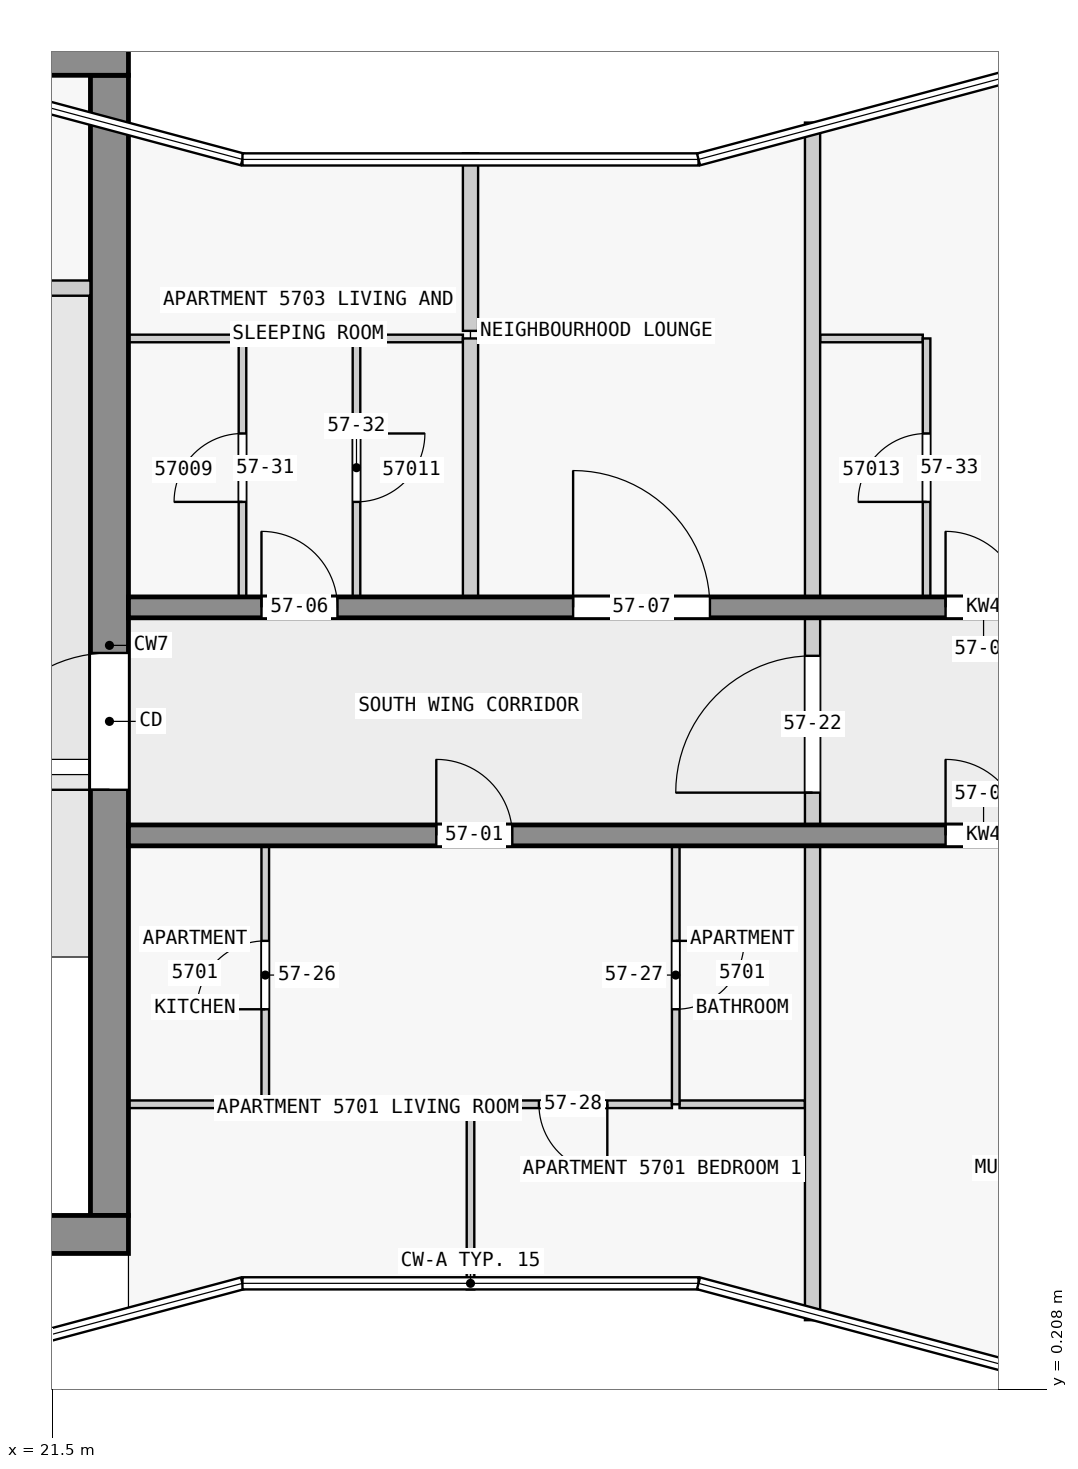
"""IFC4 building model, lengths in metres.
Left out: names, types, materials, properties, quantities, classifications, styles, units other than length and angle.
Written with IfcOpenShell. Run it as: python <this file> out.ifc"""

import sys

from ifc_helpers import new_model, si_unit, direction, frame, frame_2d, origin, place, context, subcontext, project, spatial, rectangle, extrude, element, fill, save


model = new_model("IFC4")
c1 = context("Model", 3, precision=1e-05, world=origin(), true_north=direction((0.0, 1.0)))
c2 = subcontext(c1, "Body", "Model", "MODEL_VIEW")
j1 = project(units=[si_unit("LENGTHUNIT", "METRE"), si_unit("PLANEANGLEUNIT", "RADIAN")], contexts=[c1])
p1 = place(None, origin())
s1 = spatial("IfcSite", under=j1, at=p1, CompositionType="ELEMENT")
p2 = place(p1, origin())
s2 = spatial("IfcBuilding", under=s1, at=p2, CompositionType="ELEMENT")
p3 = place(p2, frame((0.0, 0.0, 218.9)))
s3 = spatial("IfcBuildingStorey", under=s2, at=p3, CompositionType="ELEMENT", Elevation=218.9)
p4 = place(p3, frame((1.8, 2.25, 0.0), z_axis=(0.0, 0.0, 1.0), x_axis=(1.0, 0.0, 0.0)))
e1 = element("IfcWall", 1, at=p4, inside=s3, PredefinedType="SHEAR", context=c2, shape_type="SweptSolid", body=[
    extrude(rectangle(XDim=20.7, YDim=0.5, at=frame_2d((10.35, 0.0))), origin(), (0.0, 0.0, 1.0), 3.25),
])
p5 = place(p3, frame((1.38, 17.75, 0.0), z_axis=(0.0, 0.0, 1.0), x_axis=(1.0, 0.0, 0.0)))
e2 = element("IfcWall", 2, at=p5, inside=s3, PredefinedType="SHEAR", context=c2, shape_type="SweptSolid", body=[
    extrude(rectangle(XDim=21.12, YDim=0.5, at=frame_2d((10.56, 0.0))), origin(), (0.0, 0.0, 1.0), 3.25),
])
p6 = place(p5, frame((6.3, 0.0, 0.0)))
e3 = element("IfcOpeningElement", 3, at=p6, cuts=e2, PredefinedType="OPENING", context=c2, shape_type="SweptSolid", body=[
    extrude(rectangle(XDim=1.8, YDim=2.1, at=frame_2d((0.9, 1.05))), frame((0.0, 0.26, 0.0), z_axis=(0.0, -1.0, 0.0), x_axis=(1.0, 0.0, 0.0)), (0.0, 0.0, 1.0), 0.52),
])
p7 = place(p3, frame((22.25, 2.5, 0.0), z_axis=(0.0, 0.0, 1.0), x_axis=(0.0, 1.0, 0.0)))
e4 = element("IfcWall", 4, at=p7, inside=s3, PredefinedType="SHEAR", context=c2, shape_type="SweptSolid", body=[
    extrude(rectangle(XDim=15.0, YDim=0.5, at=frame_2d((7.5, 0.0))), origin(), (0.0, 0.0, 1.0), 3.25),
])
p8 = place(p7, frame((5.6, 0.0, 0.0)))
e5 = element("IfcOpeningElement", 5, at=p8, cuts=e4, PredefinedType="OPENING", context=c2, shape_type="SweptSolid", body=[
    extrude(rectangle(XDim=1.8, YDim=2.1, at=frame_2d((0.9, 1.05))), frame((0.0, 0.26, 0.0), z_axis=(0.0, -1.0, 0.0), x_axis=(1.0, 0.0, 0.0)), (0.0, 0.0, 1.0), 0.52),
])
p9 = place(p3, frame((22.5, 7.5, 0.0), z_axis=(0.0, 0.0, 1.0), x_axis=(1.0, 0.0, 0.0)))
e6 = element("IfcWall", 6, at=p9, inside=s3, PredefinedType="SHEAR", context=c2, shape_type="SweptSolid", body=[
    extrude(rectangle(XDim=22.5, YDim=0.275, at=frame_2d((11.25, 0.0))), origin(), (0.0, 0.0, 1.0), 3.25),
])
p10 = place(p9, frame((4.05, 0.0, 0.0)))
e7 = element("IfcOpeningElement", 7, at=p10, cuts=e6, PredefinedType="OPENING", context=c2, shape_type="SweptSolid", body=[
    extrude(rectangle(XDim=1.0, YDim=2.1, at=frame_2d((0.5, 1.05))), frame((0.0, 0.147, 0.0), z_axis=(0.0, -1.0, 0.0), x_axis=(1.0, 0.0, 0.0)), (0.0, 0.0, 1.0), 0.295),
])
p11 = place(p9, frame((10.75, 0.0, 0.0)))
e8 = element("IfcOpeningElement", 8, at=p11, cuts=e6, PredefinedType="OPENING", context=c2, shape_type="SweptSolid", body=[
    extrude(rectangle(XDim=1.0, YDim=2.1, at=frame_2d((0.5, 1.05))), frame((0.0, 0.147, 0.0), z_axis=(0.0, -1.0, 0.0), x_axis=(1.0, 0.0, 0.0)), (0.0, 0.0, 1.0), 0.295),
])
p12 = place(p9, frame((15.25, 0.0, 0.0)))
e9 = element("IfcOpeningElement", 9, at=p12, cuts=e6, PredefinedType="OPENING", context=c2, shape_type="SweptSolid", body=[
    extrude(rectangle(XDim=1.0, YDim=2.1, at=frame_2d((0.5, 1.05))), frame((0.0, 0.147, 0.0), z_axis=(0.0, -1.0, 0.0), x_axis=(1.0, 0.0, 0.0)), (0.0, 0.0, 1.0), 0.295),
])
p13 = place(p9, frame((18.75, 0.0, 0.0)))
e10 = element("IfcOpeningElement", 10, at=p13, cuts=e6, PredefinedType="OPENING", context=c2, shape_type="SweptSolid", body=[
    extrude(rectangle(XDim=0.9, YDim=2.1, at=frame_2d((0.45, 1.05))), frame((0.0, 0.147, 0.0), z_axis=(0.0, -1.0, 0.0), x_axis=(1.0, 0.0, 0.0)), (0.0, 0.0, 1.0), 0.295),
])
p14 = place(p9, frame((20.95, 0.0, 0.0)))
e11 = element("IfcOpeningElement", 11, at=p14, cuts=e6, PredefinedType="OPENING", context=c2, shape_type="SweptSolid", body=[
    extrude(rectangle(XDim=1.0, YDim=2.1, at=frame_2d((0.5, 1.05))), frame((0.0, 0.147, 0.0), z_axis=(0.0, -1.0, 0.0), x_axis=(1.0, 0.0, 0.0)), (0.0, 0.0, 1.0), 0.295),
])
p15 = place(p3, frame((22.5, 10.5, 0.0), z_axis=(0.0, 0.0, 1.0), x_axis=(1.0, 0.0, 0.0)))
e12 = element("IfcWall", 12, at=p15, inside=s3, PredefinedType="SHEAR", context=c2, shape_type="SweptSolid", body=[
    extrude(rectangle(XDim=22.5, YDim=0.275, at=frame_2d((11.25, 0.0))), origin(), (0.0, 0.0, 1.0), 3.25),
])
p16 = place(p15, frame((1.75, 0.0, 0.0)))
e13 = element("IfcOpeningElement", 13, at=p16, cuts=e12, PredefinedType="OPENING", context=c2, shape_type="SweptSolid", body=[
    extrude(rectangle(XDim=1.0, YDim=2.1, at=frame_2d((0.5, 1.05))), frame((0.0, 0.147, 0.0), z_axis=(0.0, -1.0, 0.0), x_axis=(1.0, 0.0, 0.0)), (0.0, 0.0, 1.0), 0.295),
])
p17 = place(p15, frame((5.85, 0.0, 0.0)))
e14 = element("IfcOpeningElement", 14, at=p17, cuts=e12, PredefinedType="OPENING", context=c2, shape_type="SweptSolid", body=[
    extrude(rectangle(XDim=1.8, YDim=2.1, at=frame_2d((0.9, 1.05))), frame((0.0, 0.147, 0.0), z_axis=(0.0, -1.0, 0.0), x_axis=(1.0, 0.0, 0.0)), (0.0, 0.0, 1.0), 0.295),
])
p18 = place(p15, frame((10.75, 0.0, 0.0)))
e15 = element("IfcOpeningElement", 15, at=p18, cuts=e12, PredefinedType="OPENING", context=c2, shape_type="SweptSolid", body=[
    extrude(rectangle(XDim=1.0, YDim=2.1, at=frame_2d((0.5, 1.05))), frame((0.0, 0.147, 0.0), z_axis=(0.0, -1.0, 0.0), x_axis=(1.0, 0.0, 0.0)), (0.0, 0.0, 1.0), 0.295),
])
p19 = place(p15, frame((16.85, 0.0, 0.0)))
e16 = element("IfcOpeningElement", 16, at=p19, cuts=e12, PredefinedType="OPENING", context=c2, shape_type="SweptSolid", body=[
    extrude(rectangle(XDim=1.0, YDim=2.1, at=frame_2d((0.5, 1.05))), frame((0.0, 0.147, 0.0), z_axis=(0.0, -1.0, 0.0), x_axis=(1.0, 0.0, 0.0)), (0.0, 0.0, 1.0), 0.295),
])
p20 = place(p3, frame((18.6, 14.7, 0.0), z_axis=(0.0, 0.0, 1.0), x_axis=(1.0, 0.0, 0.0)))
e17 = element("IfcWall", 17, at=p20, inside=s3, PredefinedType="PARTITIONING", context=c2, shape_type="SweptSolid", body=[
    extrude(rectangle(XDim=3.4, YDim=0.2, at=frame_2d((1.7, 0.0))), origin(), (0.0, 0.0, 1.0), 3.25),
])
p21 = place(p20, frame((0.15, 0.0, 0.0)))
e18 = element("IfcOpeningElement", 18, at=p21, cuts=e17, PredefinedType="OPENING", context=c2, shape_type="SweptSolid", body=[
    extrude(rectangle(XDim=0.9, YDim=2.1, at=frame_2d((0.45, 1.05))), frame((0.0, 0.11, 0.0), z_axis=(0.0, -1.0, 0.0), x_axis=(1.0, 0.0, 0.0)), (0.0, 0.0, 1.0), 0.22),
])
p22 = place(p20, frame((1.85, 0.0, 0.0)))
e19 = element("IfcOpeningElement", 19, at=p22, cuts=e17, PredefinedType="OPENING", context=c2, shape_type="SweptSolid", body=[
    extrude(rectangle(XDim=0.9, YDim=2.1, at=frame_2d((0.45, 1.05))), frame((0.0, 0.11, 0.0), z_axis=(0.0, -1.0, 0.0), x_axis=(1.0, 0.0, 0.0)), (0.0, 0.0, 1.0), 0.22),
])
p23 = place(p3, frame((29.65, 3.962, 0.0), z_axis=(0.0, 0.0, 1.0), x_axis=(-1.0, 0.0, 0.0)))
e20 = element("IfcWall", 20, at=p23, inside=s3, PredefinedType="PARTITIONING", context=c2, shape_type="SweptSolid", body=[
    extrude(rectangle(XDim=2.65, YDim=0.1, at=frame_2d((1.325, 0.0))), origin(), (0.0, 0.0, 1.0), 3.25),
])
p24 = place(p23, frame((0.85, 0.0, 0.0)))
e21 = element("IfcOpeningElement", 21, at=p24, cuts=e20, PredefinedType="OPENING", context=c2, shape_type="SweptSolid", body=[
    extrude(rectangle(XDim=0.9, YDim=2.1, at=frame_2d((0.45, 1.05))), frame((0.0, 0.06, 0.0), z_axis=(0.0, -1.0, 0.0), x_axis=(1.0, 0.0, 0.0)), (0.0, 0.0, 1.0), 0.12),
])
p25 = place(p3, frame((22.5, 3.962, 0.0), z_axis=(0.0, 0.0, 1.0), x_axis=(1.0, 0.0, 0.0)))
e22 = element("IfcWall", 22, at=p25, inside=s3, PredefinedType="PARTITIONING", context=c2, shape_type="SweptSolid", body=[
    extrude(rectangle(XDim=1.75, YDim=0.1, at=frame_2d((0.875, 0.0))), origin(), (0.0, 0.0, 1.0), 3.25),
])
p26 = place(p3, frame((29.75, 3.962, 0.0), z_axis=(0.0, 0.0, 1.0), x_axis=(1.0, 0.0, 0.0)))
e23 = element("IfcWall", 23, at=p26, inside=s3, PredefinedType="PARTITIONING", context=c2, shape_type="SweptSolid", body=[
    extrude(rectangle(XDim=1.65, YDim=0.1, at=frame_2d((0.825, 0.0))), origin(), (0.0, 0.0, 1.0), 3.25),
])
p27 = place(p3, frame((23.95, 14.038, 0.0), z_axis=(0.0, 0.0, 1.0), x_axis=(-1.0, 0.0, 0.0)))
e24 = element("IfcWall", 24, at=p27, inside=s3, PredefinedType="PARTITIONING", context=c2, shape_type="SweptSolid", body=[
    extrude(rectangle(XDim=1.45, YDim=0.1, at=frame_2d((0.725, 0.0))), origin(), (0.0, 0.0, 1.0), 3.25),
])
for number, where, z_axis, x_axis in (
    (25, (26.9, 14.038, 0.0), (0.0, 0.0, 1.0), (-1.0, 0.0, 0.0)),
    (26, (32.95, 14.038, 0.0), (0.0, 0.0, 1.0), (-1.0, 0.0, 0.0)),
):
    element("IfcWall", number, at=place(p3, frame(where, z_axis=z_axis, x_axis=x_axis)), inside=s3, PredefinedType="PARTITIONING", context=c2, shape_type="SweptSolid", body=[
        extrude(rectangle(XDim=1.35, YDim=0.1, at=frame_2d((0.675, 0.0))), origin(), (0.0, 0.0, 1.0), 3.25),
    ])
p28 = place(p3, frame((24.0, 10.637, 0.0), z_axis=(0.0, 0.0, 1.0), x_axis=(0.0, 1.0, 0.0)))
e27 = element("IfcWall", 27, at=p28, inside=s3, PredefinedType="PARTITIONING", context=c2, shape_type="SweptSolid", body=[
    extrude(rectangle(XDim=3.4, YDim=0.1, at=frame_2d((1.7, 0.0))), origin(), (0.0, 0.0, 1.0), 3.25),
])
p29 = place(p28, frame((1.25, 0.0, 0.0)))
e28 = element("IfcOpeningElement", 28, at=p29, cuts=e27, PredefinedType="OPENING", context=c2, shape_type="SweptSolid", body=[
    extrude(rectangle(XDim=0.9, YDim=2.1, at=frame_2d((0.45, 1.05))), frame((0.0, 0.06, 0.0), z_axis=(0.0, -1.0, 0.0), x_axis=(1.0, 0.0, 0.0)), (0.0, 0.0, 1.0), 0.12),
])
p30 = place(p3, frame((24.3, 3.962, 0.0), z_axis=(0.0, 0.0, 1.0), x_axis=(0.0, 1.0, 0.0)))
e29 = element("IfcWall", 29, at=p30, inside=s3, PredefinedType="PARTITIONING", context=c2, shape_type="SweptSolid", body=[
    extrude(rectangle(XDim=3.4, YDim=0.1, at=frame_2d((1.7, 0.0))), origin(), (0.0, 0.0, 1.0), 3.25),
])
p31 = place(p30, frame((1.25, 0.0, 0.0)))
e30 = element("IfcOpeningElement", 30, at=p31, cuts=e29, PredefinedType="OPENING", context=c2, shape_type="SweptSolid", body=[
    extrude(rectangle(XDim=0.9, YDim=2.1, at=frame_2d((0.45, 1.05))), frame((0.0, 0.06, 0.0), z_axis=(0.0, -1.0, 0.0), x_axis=(1.0, 0.0, 0.0)), (0.0, 0.0, 1.0), 0.12),
])
p32 = place(p3, frame((25.5, 14.038, 0.0), z_axis=(0.0, 0.0, 1.0), x_axis=(0.0, -1.0, 0.0)))
e31 = element("IfcWall", 31, at=p32, inside=s3, PredefinedType="PARTITIONING", context=c2, shape_type="SweptSolid", body=[
    extrude(rectangle(XDim=3.4, YDim=0.1, at=frame_2d((1.7, 0.0))), origin(), (0.0, 0.0, 1.0), 3.25),
])
p33 = place(p32, frame((1.25, 0.0, 0.0)))
e32 = element("IfcOpeningElement", 32, at=p33, cuts=e31, PredefinedType="OPENING", context=c2, shape_type="SweptSolid", body=[
    extrude(rectangle(XDim=0.9, YDim=2.1, at=frame_2d((0.45, 1.05))), frame((0.0, 0.06, 0.0), z_axis=(0.0, -1.0, 0.0), x_axis=(1.0, 0.0, 0.0)), (0.0, 0.0, 1.0), 0.12),
])
p34 = place(p3, frame((27.0, 3.913, 0.0), z_axis=(0.0, 0.0, 1.0), x_axis=(0.0, -1.0, 0.0)))
e33 = element("IfcWall", 33, at=p34, inside=s3, PredefinedType="PARTITIONING", context=c2, shape_type="SweptSolid", body=[
    extrude(rectangle(XDim=2.386, YDim=0.1, at=frame_2d((1.193, 0.0))), origin(), (0.0, 0.0, 1.0), 3.25),
])
p35 = place(p3, frame((27.0, 16.473, 0.0), z_axis=(0.0, 0.0, 1.0), x_axis=(0.0, -1.0, 0.0)))
e34 = element("IfcWall", 34, at=p35, inside=s3, PredefinedType="PARTITIONING", context=c2, shape_type="SweptSolid", body=[
    extrude(rectangle(XDim=2.336, YDim=0.2, at=frame_2d((1.168, 0.0))), origin(), (0.0, 0.0, 1.0), 3.25),
])
p36 = place(p3, frame((27.0, 10.637, 0.0), z_axis=(0.0, 0.0, 1.0), x_axis=(0.0, 1.0, 0.0)))
e35 = element("IfcWall", 35, at=p36, inside=s3, PredefinedType="PARTITIONING", context=c2, shape_type="SweptSolid", body=[
    extrude(rectangle(XDim=3.4, YDim=0.2, at=frame_2d((1.7, 0.0))), origin(), (0.0, 0.0, 1.0), 3.25),
])
p37 = place(p3, frame((29.7, 7.363, 0.0), z_axis=(0.0, 0.0, 1.0), x_axis=(0.0, -1.0, 0.0)))
e36 = element("IfcWall", 36, at=p37, inside=s3, PredefinedType="PARTITIONING", context=c2, shape_type="SweptSolid", body=[
    extrude(rectangle(XDim=3.4, YDim=0.1, at=frame_2d((1.7, 0.0))), origin(), (0.0, 0.0, 1.0), 3.25),
])
p38 = place(p37, frame((1.25, 0.0, 0.0)))
e37 = element("IfcOpeningElement", 37, at=p38, cuts=e36, PredefinedType="OPENING", context=c2, shape_type="SweptSolid", body=[
    extrude(rectangle(XDim=0.9, YDim=2.1, at=frame_2d((0.45, 1.05))), frame((0.0, 0.06, 0.0), z_axis=(0.0, -1.0, 0.0), x_axis=(1.0, 0.0, 0.0)), (0.0, 0.0, 1.0), 0.12),
])
for number, where, z_axis, x_axis in (
    (38, (31.5, 1.122, 0.0), (0.0, 0.0, 1.0), (0.0, 1.0, 0.0)),
    (39, (31.5, 10.637, 0.0), (0.0, 0.0, 1.0), (0.0, 1.0, 0.0)),
):
    element("IfcWall", number, at=place(p3, frame(where, z_axis=z_axis, x_axis=x_axis)), inside=s3, PredefinedType="PARTITIONING", context=c2, shape_type="SweptSolid", body=[
        extrude(rectangle(XDim=6.24, YDim=0.2, at=frame_2d((3.12, 0.0))), origin(), (0.0, 0.0, 1.0), 3.25),
    ])
p39 = place(p3, frame((33.0, 10.637, 0.0), z_axis=(0.0, 0.0, 1.0), x_axis=(0.0, 1.0, 0.0)))
e40 = element("IfcWall", 40, at=p39, inside=s3, PredefinedType="PARTITIONING", context=c2, shape_type="SweptSolid", body=[
    extrude(rectangle(XDim=3.4, YDim=0.1, at=frame_2d((1.7, 0.0))), origin(), (0.0, 0.0, 1.0), 3.25),
])
p40 = place(p39, frame((1.25, 0.0, 0.0)))
e41 = element("IfcOpeningElement", 41, at=p40, cuts=e40, PredefinedType="OPENING", context=c2, shape_type="SweptSolid", body=[
    extrude(rectangle(XDim=0.9, YDim=2.1, at=frame_2d((0.45, 1.05))), frame((0.0, 0.06, 0.0), z_axis=(0.0, -1.0, 0.0), x_axis=(1.0, 0.0, 0.0)), (0.0, 0.0, 1.0), 0.12),
])
p41 = place(p3, frame((31.5, 7.462, 0.0), z_axis=(0.0, 0.0, 1.0), x_axis=(0.0, 1.0, 0.0)))
e42 = element("IfcWall", 42, at=p41, inside=s3, PredefinedType="PARTITIONING", context=c2, shape_type="SweptSolid", body=[
    extrude(rectangle(XDim=3.075, YDim=0.2, at=frame_2d((1.538, 0.0))), origin(), (0.0, 0.0, 1.0), 3.25),
])
p42 = place(p41, frame((0.6, 0.0, 0.0)))
e43 = element("IfcOpeningElement", 43, at=p42, cuts=e42, PredefinedType="OPENING", context=c2, shape_type="SweptSolid", body=[
    extrude(rectangle(XDim=1.8, YDim=2.1, at=frame_2d((0.9, 1.05))), frame((0.0, 0.11, 0.0), z_axis=(0.0, -1.0, 0.0), x_axis=(1.0, 0.0, 0.0)), (0.0, 0.0, 1.0), 0.22),
])
p43 = place(p8, origin())
e44 = element("IfcDoor", 44, at=p43, inside=s3, OperationType="DOUBLE_DOOR_SINGLE_SWING", PredefinedType="DOOR", context=c2, shape_type="SweptSolid", body=[
    extrude(rectangle(XDim=1.8, YDim=2.1, at=frame_2d((0.9, 1.05))), frame((0.0, 0.025, 0.0), z_axis=(0.0, -1.0, 0.0), x_axis=(1.0, 0.0, 0.0)), (0.0, 0.0, 1.0), 0.05),
])
fill(e5, e44)
p44 = place(p10, origin())
e45 = element("IfcDoor", 45, at=p44, inside=s3, OperationType="SINGLE_SWING_LEFT", PredefinedType="DOOR", context=c2, shape_type="SweptSolid", body=[
    extrude(rectangle(XDim=1.0, YDim=2.1, at=frame_2d((0.5, 1.05))), frame((0.0, 0.025, 0.0), z_axis=(0.0, -1.0, 0.0), x_axis=(1.0, 0.0, 0.0)), (0.0, 0.0, 1.0), 0.05),
])
fill(e7, e45)
p45 = place(p11, origin())
e46 = element("IfcDoor", 46, at=p45, inside=s3, OperationType="SINGLE_SWING_LEFT", PredefinedType="DOOR", context=c2, shape_type="SweptSolid", body=[
    extrude(rectangle(XDim=1.0, YDim=2.1, at=frame_2d((0.5, 1.05))), frame((0.0, 0.025, 0.0), z_axis=(0.0, -1.0, 0.0), x_axis=(1.0, 0.0, 0.0)), (0.0, 0.0, 1.0), 0.05),
])
fill(e8, e46)
p46 = place(p16, origin())
e47 = element("IfcDoor", 47, at=p46, inside=s3, OperationType="SINGLE_SWING_LEFT", PredefinedType="DOOR", context=c2, shape_type="SweptSolid", body=[
    extrude(rectangle(XDim=1.0, YDim=2.1, at=frame_2d((0.5, 1.05))), frame((0.0, 0.025, 0.0), z_axis=(0.0, -1.0, 0.0), x_axis=(1.0, 0.0, 0.0)), (0.0, 0.0, 1.0), 0.05),
])
fill(e13, e47)
p47 = place(p17, origin())
e48 = element("IfcDoor", 48, at=p47, inside=s3, OperationType="SINGLE_SWING_LEFT", PredefinedType="DOOR", context=c2, shape_type="SweptSolid", body=[
    extrude(rectangle(XDim=1.8, YDim=2.1, at=frame_2d((0.9, 1.05))), frame((0.0, 0.025, 0.0), z_axis=(0.0, -1.0, 0.0), x_axis=(1.0, 0.0, 0.0)), (0.0, 0.0, 1.0), 0.05),
])
fill(e14, e48)
p48 = place(p18, origin())
e49 = element("IfcDoor", 49, at=p48, inside=s3, OperationType="SINGLE_SWING_LEFT", PredefinedType="DOOR", context=c2, shape_type="SweptSolid", body=[
    extrude(rectangle(XDim=1.0, YDim=2.1, at=frame_2d((0.5, 1.05))), frame((0.0, 0.025, 0.0), z_axis=(0.0, -1.0, 0.0), x_axis=(1.0, 0.0, 0.0)), (0.0, 0.0, 1.0), 0.05),
])
fill(e15, e49)
p49 = place(p42, origin())
e50 = element("IfcDoor", 50, at=p49, inside=s3, OperationType="SINGLE_SWING_LEFT", PredefinedType="DOOR", context=c2, shape_type="SweptSolid", body=[
    extrude(rectangle(XDim=1.8, YDim=2.1, at=frame_2d((0.9, 1.05))), frame((0.0, 0.025, 0.0), z_axis=(0.0, -1.0, 0.0), x_axis=(1.0, 0.0, 0.0)), (0.0, 0.0, 1.0), 0.05),
])
fill(e43, e50)
p50 = place(p31, origin())
e51 = element("IfcDoor", 51, at=p50, inside=s3, OperationType="SINGLE_SWING_LEFT", PredefinedType="DOOR", context=c2, shape_type="SweptSolid", body=[
    extrude(rectangle(XDim=0.9, YDim=2.1, at=frame_2d((0.45, 1.05))), frame((0.0, 0.025, 0.0), z_axis=(0.0, -1.0, 0.0), x_axis=(1.0, 0.0, 0.0)), (0.0, 0.0, 1.0), 0.05),
])
fill(e30, e51)
p51 = place(p38, origin())
e52 = element("IfcDoor", 52, at=p51, inside=s3, OperationType="SINGLE_SWING_LEFT", PredefinedType="DOOR", context=c2, shape_type="SweptSolid", body=[
    extrude(rectangle(XDim=0.9, YDim=2.1, at=frame_2d((0.45, 1.05))), frame((0.0, 0.025, 0.0), z_axis=(0.0, -1.0, 0.0), x_axis=(1.0, 0.0, 0.0)), (0.0, 0.0, 1.0), 0.05),
])
fill(e37, e52)
p52 = place(p24, origin())
e53 = element("IfcDoor", 53, at=p52, inside=s3, OperationType="SINGLE_SWING_LEFT", PredefinedType="DOOR", context=c2, shape_type="SweptSolid", body=[
    extrude(rectangle(XDim=0.9, YDim=2.1, at=frame_2d((0.45, 1.05))), frame((0.0, 0.025, 0.0), z_axis=(0.0, -1.0, 0.0), x_axis=(1.0, 0.0, 0.0)), (0.0, 0.0, 1.0), 0.05),
])
fill(e21, e53)
p53 = place(p29, origin())
e54 = element("IfcDoor", 54, at=p53, inside=s3, OperationType="SINGLE_SWING_LEFT", PredefinedType="DOOR", context=c2, shape_type="SweptSolid", body=[
    extrude(rectangle(XDim=0.9, YDim=2.1, at=frame_2d((0.45, 1.05))), frame((0.0, 0.025, 0.0), z_axis=(0.0, -1.0, 0.0), x_axis=(1.0, 0.0, 0.0)), (0.0, 0.0, 1.0), 0.05),
])
fill(e28, e54)
p54 = place(p33, origin())
e55 = element("IfcDoor", 55, at=p54, inside=s3, OperationType="SINGLE_SWING_LEFT", PredefinedType="DOOR", context=c2, shape_type="SweptSolid", body=[
    extrude(rectangle(XDim=0.9, YDim=2.1, at=frame_2d((0.45, 1.05))), frame((0.0, 0.025, 0.0), z_axis=(0.0, -1.0, 0.0), x_axis=(1.0, 0.0, 0.0)), (0.0, 0.0, 1.0), 0.05),
])
fill(e32, e55)
p55 = place(p40, origin())
e56 = element("IfcDoor", 56, at=p55, inside=s3, OperationType="SINGLE_SWING_LEFT", PredefinedType="DOOR", context=c2, shape_type="SweptSolid", body=[
    extrude(rectangle(XDim=0.9, YDim=2.1, at=frame_2d((0.45, 1.05))), frame((0.0, 0.025, 0.0), z_axis=(0.0, -1.0, 0.0), x_axis=(1.0, 0.0, 0.0)), (0.0, 0.0, 1.0), 0.05),
])
fill(e41, e56)
save(model, sys.argv[1])
